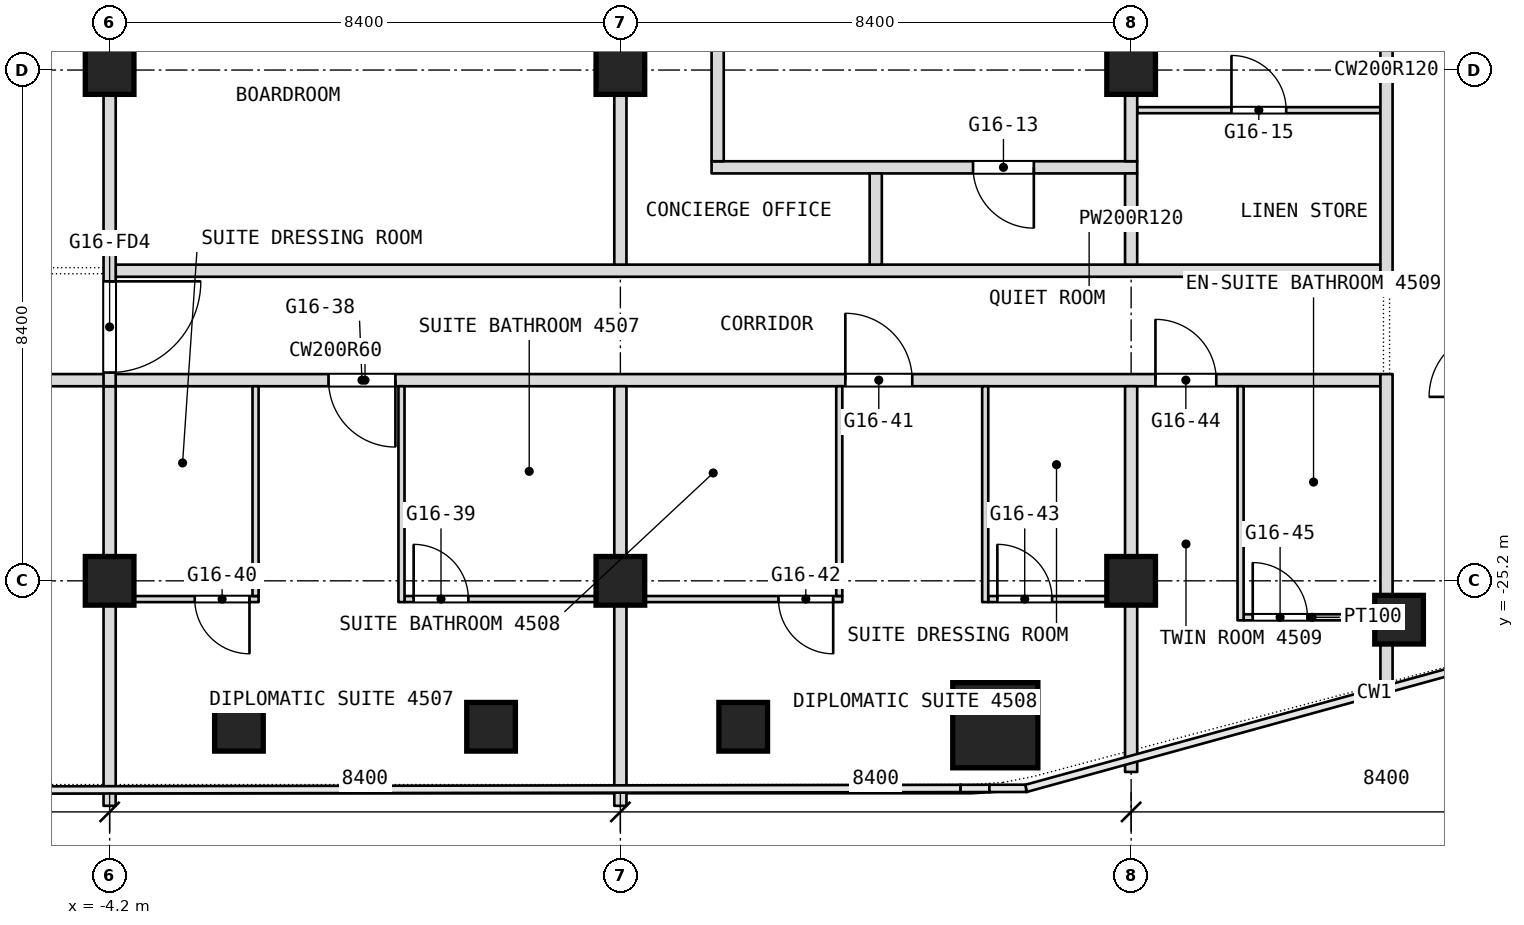
"""IFC4 building model, lengths in metres.
Left out: names, types, materials, properties, quantities, classifications, styles, units other than length and angle.
Written with IfcOpenShell. Run it as: python <this file> out.ifc"""

import sys

from ifc_helpers import new_model, si_unit, direction, frame, frame_2d, origin, origin_2d, place, context, subcontext, project, spatial, rectangle, extrude, element, fill, save


model = new_model("IFC4")
c1 = context("Model", 3, precision=1e-05, world=origin(), true_north=direction((0.0, 1.0)))
c2 = subcontext(c1, "Body", "Model", "MODEL_VIEW")
j1 = project(units=[si_unit("LENGTHUNIT", "METRE"), si_unit("PLANEANGLEUNIT", "RADIAN")], contexts=[c1])
p1 = place(None, origin())
s1 = spatial("IfcSite", under=j1, at=p1, CompositionType="ELEMENT")
p2 = place(p1, origin())
s2 = spatial("IfcBuilding", under=s1, at=p2, CompositionType="ELEMENT")
p3 = place(p2, frame((0.0, 0.0, 198.5)))
s3 = spatial("IfcBuildingStorey", under=s2, at=p3, CompositionType="ELEMENT", Elevation=198.5)
p4 = place(p3, frame((10.366, -27.575, 0.0), z_axis=(0.0, 0.0, 1.0), x_axis=(1.0, 0.0, 0.0)))
e1 = element("IfcColumn", 1, at=p4, inside=s3, PredefinedType="COLUMN", context=c2, shape_type="SweptSolid", body=[
    extrude(rectangle(XDim=1.4, YDim=1.4, at=origin_2d()), origin(), (0.0, 0.0, 1.0), 3.6),
])
for number, where, z_axis, x_axis in (
    (2, (-4.2, -25.2, 0.0), (0.0, 0.0, 1.0), (1.0, 0.0, 0.0)),
    (3, (-4.2, -16.8, 0.0), (0.0, 0.0, 1.0), (1.0, 0.0, 0.0)),
    (4, (4.2, -25.2, 0.0), (0.0, 0.0, 1.0), (1.0, 0.0, 0.0)),
    (5, (4.2, -16.8, 0.0), (0.0, 0.0, 1.0), (1.0, 0.0, 0.0)),
    (6, (12.6, -25.2, 0.0), (0.0, 0.0, 1.0), (1.0, 0.0, 0.0)),
    (7, (12.6, -16.8, 0.0), (0.0, 0.0, 1.0), (1.0, 0.0, 0.0)),
    (8, (17.007, -25.839, 0.0), (0.0, 0.0, 1.0), (1.0, 0.0, 0.0)),
    (9, (6.22, -27.6, 0.0), (0.0, 0.0, 1.0), (1.0, 0.0, 0.0)),
    (10, (2.073, -27.6, 0.0), (0.0, 0.0, 1.0), (1.0, 0.0, 0.0)),
    (11, (-2.073, -27.6, 0.0), (0.0, 0.0, 1.0), (1.0, 0.0, 0.0)),
):
    element("IfcColumn", number, at=place(p3, frame(where, z_axis=z_axis, x_axis=x_axis)), inside=s3, PredefinedType="COLUMN", context=c2, shape_type="SweptSolid", body=[
        extrude(rectangle(XDim=0.8, YDim=0.8, at=origin_2d()), origin(), (0.0, 0.0, 1.0), 3.6),
    ])
p5 = place(p3, frame((14.45, -25.8, 0.0), z_axis=(0.0, 0.0, 1.0), x_axis=(1.0, 0.0, 0.0)))
e12 = element("IfcWall", 12, at=p5, inside=s3, PredefinedType="PARTITIONING", context=c2, shape_type="SweptSolid", body=[
    extrude(rectangle(XDim=2.25, YDim=0.1, at=frame_2d((1.125, 0.0))), origin(), (0.0, 0.0, 1.0), 3.34),
])
p6 = place(p5, frame((0.15, 0.0, 0.0)))
e13 = element("IfcOpeningElement", 13, at=p6, cuts=e12, PredefinedType="OPENING", context=c2, shape_type="SweptSolid", body=[
    extrude(rectangle(XDim=0.9, YDim=2.1, at=frame_2d((0.45, 1.05))), frame((0.0, 0.05, 0.0), z_axis=(0.0, -1.0, 0.0), x_axis=(1.0, 0.0, 0.0)), (0.0, 0.0, 1.0), 0.1),
])
p7 = place(p3, frame((-4.1, -25.5, 0.0), z_axis=(0.0, 0.0, 1.0), x_axis=(1.0, 0.0, 0.0)))
e14 = element("IfcWall", 14, at=p7, inside=s3, PredefinedType="PARTITIONING", context=c2, shape_type="SweptSolid", body=[
    extrude(rectangle(XDim=2.35, YDim=0.1, at=frame_2d((1.175, 0.0))), origin(), (0.0, 0.0, 1.0), 3.34),
])
p8 = place(p7, frame((1.3, 0.0, 0.0)))
e15 = element("IfcOpeningElement", 15, at=p8, cuts=e14, PredefinedType="OPENING", context=c2, shape_type="SweptSolid", body=[
    extrude(rectangle(XDim=0.9, YDim=2.1, at=frame_2d((0.45, 1.05))), frame((0.0, 0.05, 0.0), z_axis=(0.0, -1.0, 0.0), x_axis=(1.0, 0.0, 0.0)), (0.0, 0.0, 1.0), 0.1),
])
p9 = place(p3, frame((0.65, -25.5, 0.0), z_axis=(0.0, 0.0, 1.0), x_axis=(1.0, 0.0, 0.0)))
e16 = element("IfcWall", 16, at=p9, inside=s3, PredefinedType="PARTITIONING", context=c2, shape_type="SweptSolid", body=[
    extrude(rectangle(XDim=7.2, YDim=0.1, at=frame_2d((3.6, 0.0))), origin(), (0.0, 0.0, 1.0), 3.34),
])
p10 = place(p9, frame((0.15, 0.0, 0.0)))
e17 = element("IfcOpeningElement", 17, at=p10, cuts=e16, PredefinedType="OPENING", context=c2, shape_type="SweptSolid", body=[
    extrude(rectangle(XDim=0.9, YDim=2.1, at=frame_2d((0.45, 1.05))), frame((0.0, 0.05, 0.0), z_axis=(0.0, -1.0, 0.0), x_axis=(1.0, 0.0, 0.0)), (0.0, 0.0, 1.0), 0.1),
])
p11 = place(p9, frame((6.15, 0.0, 0.0)))
e18 = element("IfcOpeningElement", 18, at=p11, cuts=e16, PredefinedType="OPENING", context=c2, shape_type="SweptSolid", body=[
    extrude(rectangle(XDim=0.9, YDim=2.1, at=frame_2d((0.45, 1.05))), frame((0.0, 0.05, 0.0), z_axis=(0.0, -1.0, 0.0), x_axis=(1.0, 0.0, 0.0)), (0.0, 0.0, 1.0), 0.1),
])
p12 = place(p3, frame((10.25, -25.5, 0.0), z_axis=(0.0, 0.0, 1.0), x_axis=(1.0, 0.0, 0.0)))
e19 = element("IfcWall", 19, at=p12, inside=s3, PredefinedType="PARTITIONING", context=c2, shape_type="SweptSolid", body=[
    extrude(rectangle(XDim=2.45, YDim=0.1, at=frame_2d((1.225, 0.0))), origin(), (0.0, 0.0, 1.0), 3.34),
])
p13 = place(p12, frame((0.15, 0.0, 0.0)))
e20 = element("IfcOpeningElement", 20, at=p13, cuts=e19, PredefinedType="OPENING", context=c2, shape_type="SweptSolid", body=[
    extrude(rectangle(XDim=0.9, YDim=2.1, at=frame_2d((0.45, 1.05))), frame((0.0, 0.05, 0.0), z_axis=(0.0, -1.0, 0.0), x_axis=(1.0, 0.0, 0.0)), (0.0, 0.0, 1.0), 0.1),
])
p14 = place(p3, frame((-16.7, -21.9, 0.0), z_axis=(0.0, 0.0, 1.0), x_axis=(1.0, 0.0, 0.0)))
e21 = element("IfcWall", 21, at=p14, inside=s3, PredefinedType="PARTITIONING", context=c2, shape_type="SweptSolid", body=[
    extrude(rectangle(XDim=33.4, YDim=0.2, at=frame_2d((16.7, 0.0))), origin(), (0.0, 0.0, 1.0), 3.34),
])
p15 = place(p14, frame((0.3, 0.0, 0.0)))
e22 = element("IfcOpeningElement", 22, at=p15, cuts=e21, PredefinedType="OPENING", context=c2, shape_type="SweptSolid", body=[
    extrude(rectangle(XDim=1.0, YDim=2.1, at=frame_2d((0.5, 1.05))), frame((0.0, 0.1, 0.0), z_axis=(0.0, -1.0, 0.0), x_axis=(1.0, 0.0, 0.0)), (0.0, 0.0, 1.0), 0.2),
])
p16 = place(p14, frame((9.85, 0.0, 0.0)))
e23 = element("IfcOpeningElement", 23, at=p16, cuts=e21, PredefinedType="OPENING", context=c2, shape_type="SweptSolid", body=[
    extrude(rectangle(XDim=1.1, YDim=2.1, at=frame_2d((0.55, 1.05))), frame((0.0, 0.1, 0.0), z_axis=(0.0, -1.0, 0.0), x_axis=(1.0, 0.0, 0.0)), (0.0, 0.0, 1.0), 0.2),
])
p17 = place(p14, frame((16.1, 0.0, 0.0)))
e24 = element("IfcOpeningElement", 24, at=p17, cuts=e21, PredefinedType="OPENING", context=c2, shape_type="SweptSolid", body=[
    extrude(rectangle(XDim=1.1, YDim=2.1, at=frame_2d((0.55, 1.05))), frame((0.0, 0.1, 0.0), z_axis=(0.0, -1.0, 0.0), x_axis=(1.0, 0.0, 0.0)), (0.0, 0.0, 1.0), 0.2),
])
p18 = place(p14, frame((24.6, 0.0, 0.0)))
e25 = element("IfcOpeningElement", 25, at=p18, cuts=e21, PredefinedType="OPENING", context=c2, shape_type="SweptSolid", body=[
    extrude(rectangle(XDim=1.1, YDim=2.1, at=frame_2d((0.55, 1.05))), frame((0.0, 0.1, 0.0), z_axis=(0.0, -1.0, 0.0), x_axis=(1.0, 0.0, 0.0)), (0.0, 0.0, 1.0), 0.2),
])
p19 = place(p14, frame((29.7, 0.0, 0.0)))
e26 = element("IfcOpeningElement", 26, at=p19, cuts=e21, PredefinedType="OPENING", context=c2, shape_type="SweptSolid", body=[
    extrude(rectangle(XDim=1.0, YDim=2.1, at=frame_2d((0.5, 1.05))), frame((0.0, 0.1, 0.0), z_axis=(0.0, -1.0, 0.0), x_axis=(1.0, 0.0, 0.0)), (0.0, 0.0, 1.0), 0.2),
])
p20 = place(p3, frame((-4.1, -20.1, 0.0), z_axis=(0.0, 0.0, 1.0), x_axis=(1.0, 0.0, 0.0)))
e27 = element("IfcWall", 27, at=p20, inside=s3, PredefinedType="PARTITIONING", context=c2, shape_type="SweptSolid", body=[
    extrude(rectangle(XDim=20.8, YDim=0.2, at=frame_2d((10.4, 0.0))), origin(), (0.0, 0.0, 1.0), 3.34),
])
p21 = place(p3, frame((5.7, -18.4, 0.0), z_axis=(0.0, 0.0, 1.0), x_axis=(1.0, 0.0, 0.0)))
e28 = element("IfcWall", 28, at=p21, inside=s3, PredefinedType="PARTITIONING", context=c2, shape_type="SweptSolid", body=[
    extrude(rectangle(XDim=7.0, YDim=0.2, at=frame_2d((3.5, 0.0))), origin(), (0.0, 0.0, 1.0), 3.34),
])
p22 = place(p21, frame((4.3, 0.0, 0.0)))
e29 = element("IfcOpeningElement", 29, at=p22, cuts=e28, PredefinedType="OPENING", context=c2, shape_type="SweptSolid", body=[
    extrude(rectangle(XDim=1.0, YDim=2.1, at=frame_2d((0.5, 1.05))), frame((0.0, 0.1, 0.0), z_axis=(0.0, -1.0, 0.0), x_axis=(1.0, 0.0, 0.0)), (0.0, 0.0, 1.0), 0.2),
])
p23 = place(p3, frame((12.7, -17.46, 0.0), z_axis=(0.0, 0.0, 1.0), x_axis=(1.0, 0.0, 0.0)))
e30 = element("IfcWall", 30, at=p23, inside=s3, PredefinedType="PARTITIONING", context=c2, shape_type="SweptSolid", body=[
    extrude(rectangle(XDim=4.0, YDim=0.1, at=frame_2d((2.0, 0.0))), origin(), (0.0, 0.0, 1.0), 3.34),
])
p24 = place(p23, frame((1.55, 0.0, 0.0)))
e31 = element("IfcOpeningElement", 31, at=p24, cuts=e30, PredefinedType="OPENING", context=c2, shape_type="SweptSolid", body=[
    extrude(rectangle(XDim=0.9, YDim=2.1, at=frame_2d((0.45, 1.05))), frame((0.0, 0.05, 0.0), z_axis=(0.0, -1.0, 0.0), x_axis=(1.0, 0.0, 0.0)), (0.0, 0.0, 1.0), 0.1),
])
p25 = place(p3, frame((16.8, -27.229, 0.0), z_axis=(0.0, 0.0, 1.0), x_axis=(0.0, 1.0, 0.0)))
e32 = element("IfcWall", 32, at=p25, inside=s3, PredefinedType="PARTITIONING", context=c2, shape_type="SweptSolid", body=[
    extrude(rectangle(XDim=5.429, YDim=0.2, at=frame_2d((2.714, 0.0))), origin(), (0.0, 0.0, 1.0), 3.34),
])
p26 = place(p3, frame((16.8, -20.2, 0.0), z_axis=(0.0, 0.0, 1.0), x_axis=(0.0, 1.0, 0.0)))
e33 = element("IfcWall", 33, at=p26, inside=s3, PredefinedType="PARTITIONING", context=c2, shape_type="SweptSolid", body=[
    extrude(rectangle(XDim=6.8, YDim=0.2, at=frame_2d((3.4, 0.0))), origin(), (0.0, 0.0, 1.0), 3.34),
])
p27 = place(p3, frame((14.4, -25.85, 0.0), z_axis=(0.0, 0.0, 1.0), x_axis=(0.0, 1.0, 0.0)))
e34 = element("IfcWall", 34, at=p27, inside=s3, PredefinedType="PARTITIONING", context=c2, shape_type="SweptSolid", body=[
    extrude(rectangle(XDim=3.85, YDim=0.1, at=frame_2d((1.925, 0.0))), origin(), (0.0, 0.0, 1.0), 3.34),
])
p28 = place(p3, frame((12.6, -28.343, 0.0), z_axis=(0.0, 0.0, 1.0), x_axis=(0.0, 1.0, 0.0)))
e35 = element("IfcWall", 35, at=p28, inside=s3, PredefinedType="PARTITIONING", context=c2, shape_type="SweptSolid", body=[
    extrude(rectangle(XDim=6.343, YDim=0.2, at=frame_2d((3.171, 0.0))), origin(), (0.0, 0.0, 1.0), 3.34),
])
p29 = place(p3, frame((12.6, -20.0, 0.0), z_axis=(0.0, 0.0, 1.0), x_axis=(0.0, 1.0, 0.0)))
e36 = element("IfcWall", 36, at=p29, inside=s3, PredefinedType="PARTITIONING", context=c2, shape_type="SweptSolid", body=[
    extrude(rectangle(XDim=1.5, YDim=0.2, at=frame_2d((0.75, 0.0))), origin(), (0.0, 0.0, 1.0), 3.34),
])
p30 = place(p3, frame((12.6, -18.3, 0.0), z_axis=(0.0, 0.0, 1.0), x_axis=(0.0, 1.0, 0.0)))
e37 = element("IfcWall", 37, at=p30, inside=s3, PredefinedType="PARTITIONING", context=c2, shape_type="SweptSolid", body=[
    extrude(rectangle(XDim=4.7, YDim=0.2, at=frame_2d((2.35, 0.0))), origin(), (0.0, 0.0, 1.0), 3.34),
])
p31 = place(p3, frame((10.2, -25.55, 0.0), z_axis=(0.0, 0.0, 1.0), x_axis=(0.0, 1.0, 0.0)))
e38 = element("IfcWall", 38, at=p31, inside=s3, PredefinedType="PARTITIONING", context=c2, shape_type="SweptSolid", body=[
    extrude(rectangle(XDim=3.55, YDim=0.1, at=frame_2d((1.775, 0.0))), origin(), (0.0, 0.0, 1.0), 3.34),
])
p32 = place(p3, frame((8.4, -20.0, 0.0), z_axis=(0.0, 0.0, 1.0), x_axis=(0.0, 1.0, 0.0)))
e39 = element("IfcWall", 39, at=p32, inside=s3, PredefinedType="PARTITIONING", context=c2, shape_type="SweptSolid", body=[
    extrude(rectangle(XDim=1.5, YDim=0.2, at=frame_2d((0.75, 0.0))), origin(), (0.0, 0.0, 1.0), 3.34),
])
p33 = place(p3, frame((7.8, -25.45, 0.0), z_axis=(0.0, 0.0, 1.0), x_axis=(0.0, 1.0, 0.0)))
e40 = element("IfcWall", 40, at=p33, inside=s3, PredefinedType="PARTITIONING", context=c2, shape_type="SweptSolid", body=[
    extrude(rectangle(XDim=3.45, YDim=0.1, at=frame_2d((1.725, 0.0))), origin(), (0.0, 0.0, 1.0), 3.34),
])
p34 = place(p3, frame((5.8, -18.3, 0.0), z_axis=(0.0, 0.0, 1.0), x_axis=(0.0, 1.0, 0.0)))
e41 = element("IfcWall", 41, at=p34, inside=s3, PredefinedType="PARTITIONING", context=c2, shape_type="SweptSolid", body=[
    extrude(rectangle(XDim=4.9, YDim=0.2, at=frame_2d((2.45, 0.0))), origin(), (0.0, 0.0, 1.0), 3.34),
])
p35 = place(p3, frame((4.2, -28.9, 0.0), z_axis=(0.0, 0.0, 1.0), x_axis=(0.0, 1.0, 0.0)))
e42 = element("IfcWall", 42, at=p35, inside=s3, PredefinedType="PARTITIONING", context=c2, shape_type="SweptSolid", body=[
    extrude(rectangle(XDim=6.9, YDim=0.2, at=frame_2d((3.45, 0.0))), origin(), (0.0, 0.0, 1.0), 3.34),
])
p36 = place(p3, frame((4.2, -20.0, 0.0), z_axis=(0.0, 0.0, 1.0), x_axis=(0.0, 1.0, 0.0)))
e43 = element("IfcWall", 43, at=p36, inside=s3, PredefinedType="PARTITIONING", context=c2, shape_type="SweptSolid", body=[
    extrude(rectangle(XDim=6.4, YDim=0.2, at=frame_2d((3.2, 0.0))), origin(), (0.0, 0.0, 1.0), 3.34),
])
p37 = place(p3, frame((0.6, -25.55, 0.0), z_axis=(0.0, 0.0, 1.0), x_axis=(0.0, 1.0, 0.0)))
e44 = element("IfcWall", 44, at=p37, inside=s3, PredefinedType="PARTITIONING", context=c2, shape_type="SweptSolid", body=[
    extrude(rectangle(XDim=3.55, YDim=0.1, at=frame_2d((1.775, 0.0))), origin(), (0.0, 0.0, 1.0), 3.34),
])
p38 = place(p3, frame((-1.8, -25.45, 0.0), z_axis=(0.0, 0.0, 1.0), x_axis=(0.0, 1.0, 0.0)))
e45 = element("IfcWall", 45, at=p38, inside=s3, PredefinedType="PARTITIONING", context=c2, shape_type="SweptSolid", body=[
    extrude(rectangle(XDim=3.45, YDim=0.1, at=frame_2d((1.725, 0.0))), origin(), (0.0, 0.0, 1.0), 3.34),
])
p39 = place(p3, frame((-4.2, -28.9, 0.0), z_axis=(0.0, 0.0, 1.0), x_axis=(0.0, 1.0, 0.0)))
e46 = element("IfcWall", 46, at=p39, inside=s3, PredefinedType="PARTITIONING", context=c2, shape_type="SweptSolid", body=[
    extrude(rectangle(XDim=6.9, YDim=0.2, at=frame_2d((3.45, 0.0))), origin(), (0.0, 0.0, 1.0), 3.34),
])
p40 = place(p3, frame((-4.2, -22.0, 0.0), z_axis=(0.0, 0.0, 1.0), x_axis=(0.0, 1.0, 0.0)))
e47 = element("IfcWall", 47, at=p40, inside=s3, PredefinedType="PARTITIONING", context=c2, shape_type="SweptSolid", body=[
    extrude(rectangle(XDim=8.4, YDim=0.2, at=frame_2d((4.2, 0.0))), origin(), (0.0, 0.0, 1.0), 3.34),
])
p41 = place(p40, frame((0.225, 0.0, 0.0)))
e48 = element("IfcOpeningElement", 48, at=p41, cuts=e47, PredefinedType="OPENING", context=c2, shape_type="SweptSolid", body=[
    extrude(rectangle(XDim=1.5, YDim=2.1, at=frame_2d((0.75, 1.05))), frame((0.0, 0.1, 0.0), z_axis=(0.0, -1.0, 0.0), x_axis=(1.0, 0.0, 0.0)), (0.0, 0.0, 1.0), 0.2),
])
p42 = place(p6, origin())
e49 = element("IfcDoor", 49, at=p42, inside=s3, OperationType="SINGLE_SWING_LEFT", PredefinedType="DOOR", context=c2, shape_type="SweptSolid", body=[
    extrude(rectangle(XDim=0.9, YDim=2.1, at=frame_2d((0.45, 1.05))), frame((0.0, 0.025, 0.0), z_axis=(0.0, -1.0, 0.0), x_axis=(1.0, 0.0, 0.0)), (0.0, 0.0, 1.0), 0.05),
])
fill(e13, e49)
p43 = place(p8, origin())
e50 = element("IfcDoor", 50, at=p43, inside=s3, OperationType="SINGLE_SWING_RIGHT", PredefinedType="DOOR", context=c2, shape_type="SweptSolid", body=[
    extrude(rectangle(XDim=0.9, YDim=2.1, at=frame_2d((0.45, 1.05))), frame((0.0, 0.025, 0.0), z_axis=(0.0, -1.0, 0.0), x_axis=(1.0, 0.0, 0.0)), (0.0, 0.0, 1.0), 0.05),
])
fill(e15, e50)
p44 = place(p10, origin())
e51 = element("IfcDoor", 51, at=p44, inside=s3, OperationType="SINGLE_SWING_LEFT", PredefinedType="DOOR", context=c2, shape_type="SweptSolid", body=[
    extrude(rectangle(XDim=0.9, YDim=2.1, at=frame_2d((0.45, 1.05))), frame((0.0, 0.025, 0.0), z_axis=(0.0, -1.0, 0.0), x_axis=(1.0, 0.0, 0.0)), (0.0, 0.0, 1.0), 0.05),
])
fill(e17, e51)
p45 = place(p11, origin())
e52 = element("IfcDoor", 52, at=p45, inside=s3, OperationType="SINGLE_SWING_RIGHT", PredefinedType="DOOR", context=c2, shape_type="SweptSolid", body=[
    extrude(rectangle(XDim=0.9, YDim=2.1, at=frame_2d((0.45, 1.05))), frame((0.0, 0.025, 0.0), z_axis=(0.0, -1.0, 0.0), x_axis=(1.0, 0.0, 0.0)), (0.0, 0.0, 1.0), 0.05),
])
fill(e18, e52)
p46 = place(p13, origin())
e53 = element("IfcDoor", 53, at=p46, inside=s3, OperationType="SINGLE_SWING_LEFT", PredefinedType="DOOR", context=c2, shape_type="SweptSolid", body=[
    extrude(rectangle(XDim=0.9, YDim=2.1, at=frame_2d((0.45, 1.05))), frame((0.0, 0.025, 0.0), z_axis=(0.0, -1.0, 0.0), x_axis=(1.0, 0.0, 0.0)), (0.0, 0.0, 1.0), 0.05),
])
fill(e20, e53)
p47 = place(p17, origin())
e54 = element("IfcDoor", 54, at=p47, inside=s3, OperationType="SINGLE_SWING_LEFT", PredefinedType="DOOR", context=c2, shape_type="SweptSolid", body=[
    extrude(rectangle(XDim=1.1, YDim=2.1, at=frame_2d((0.55, 1.05))), frame((0.0, 0.025, 0.0), z_axis=(0.0, -1.0, 0.0), x_axis=(1.0, 0.0, 0.0)), (0.0, 0.0, 1.0), 0.05),
])
fill(e24, e54)
p48 = place(p18, origin())
e55 = element("IfcDoor", 55, at=p48, inside=s3, OperationType="SINGLE_SWING_RIGHT", PredefinedType="DOOR", context=c2, shape_type="SweptSolid", body=[
    extrude(rectangle(XDim=1.1, YDim=2.1, at=frame_2d((0.55, 1.05))), frame((0.0, 0.025, 0.0), z_axis=(0.0, -1.0, 0.0), x_axis=(1.0, 0.0, 0.0)), (0.0, 0.0, 1.0), 0.05),
])
fill(e25, e55)
p49 = place(p19, origin())
e56 = element("IfcDoor", 56, at=p49, inside=s3, OperationType="SINGLE_SWING_RIGHT", PredefinedType="DOOR", context=c2, shape_type="SweptSolid", body=[
    extrude(rectangle(XDim=1.0, YDim=2.1, at=frame_2d((0.5, 1.05))), frame((0.0, 0.025, 0.0), z_axis=(0.0, -1.0, 0.0), x_axis=(1.0, 0.0, 0.0)), (0.0, 0.0, 1.0), 0.05),
])
fill(e26, e56)
p50 = place(p22, origin())
e57 = element("IfcDoor", 57, at=p50, inside=s3, OperationType="SINGLE_SWING_RIGHT", PredefinedType="DOOR", context=c2, shape_type="SweptSolid", body=[
    extrude(rectangle(XDim=1.0, YDim=2.1, at=frame_2d((0.5, 1.05))), frame((0.0, 0.025, 0.0), z_axis=(0.0, -1.0, 0.0), x_axis=(1.0, 0.0, 0.0)), (0.0, 0.0, 1.0), 0.05),
])
fill(e29, e57)
p51 = place(p24, origin())
e58 = element("IfcDoor", 58, at=p51, inside=s3, OperationType="SINGLE_SWING_RIGHT", PredefinedType="DOOR", context=c2, shape_type="SweptSolid", body=[
    extrude(rectangle(XDim=0.9, YDim=2.1, at=frame_2d((0.45, 1.05))), frame((0.0, 0.025, 0.0), z_axis=(0.0, -1.0, 0.0), x_axis=(1.0, 0.0, 0.0)), (0.0, 0.0, 1.0), 0.05),
])
fill(e31, e58)
p52 = place(p41, origin())
e59 = element("IfcDoor", 59, at=p52, inside=s3, OperationType="DOUBLE_DOOR_DOUBLE_SWING", PredefinedType="DOOR", context=c2, shape_type="SweptSolid", body=[
    extrude(rectangle(XDim=1.5, YDim=2.1, at=frame_2d((0.75, 1.05))), frame((0.0, 0.025, 0.0), z_axis=(0.0, -1.0, 0.0), x_axis=(1.0, 0.0, 0.0)), (0.0, 0.0, 1.0), 0.05),
])
fill(e48, e59)
save(model, sys.argv[1])
